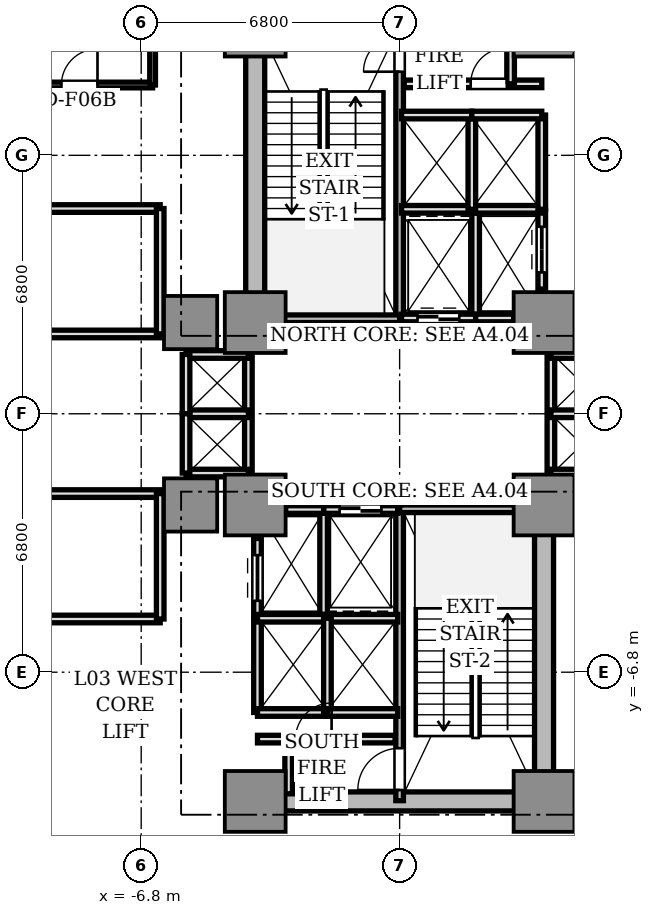
"""IFC4 building model, lengths in metres.
Left out: names, types, materials, properties, quantities, classifications, styles, units other than length and angle.
Written with IfcOpenShell. Run it as: python <this file> out.ifc"""

import sys

from ifc_helpers import new_model, si_unit, direction, frame, frame_2d, origin, origin_2d, place, context, subcontext, project, spatial, rectangle, extrude, source, transform, mapped, element, fill, save


model = new_model("IFC4")
c1 = context("Model", 3, precision=1e-05, world=origin(), true_north=direction((0.0, 1.0)))
c2 = subcontext(c1, "Body", "Model", "MODEL_VIEW")
j1 = project(units=[si_unit("LENGTHUNIT", "METRE"), si_unit("PLANEANGLEUNIT", "RADIAN")], contexts=[c1])
p1 = place(None, origin())
s1 = spatial("IfcSite", under=j1, at=p1, CompositionType="ELEMENT")
p2 = place(p1, origin())
s2 = spatial("IfcBuilding", under=s1, at=p2, CompositionType="ELEMENT")
p3 = place(p2, frame((0.0, 0.0, 14.1)))
s3 = spatial("IfcBuildingStorey", under=s2, at=p3, CompositionType="ELEMENT", Elevation=14.1)
p4 = place(p3, frame((-3.8, 2.85, 0.0), z_axis=(0.0, 0.0, 1.0), x_axis=(0.0, 1.0, 0.0)))
e1 = element("IfcWall", 1, at=p4, inside=s3, PredefinedType="SHEAR", context=c2, shape_type="SweptSolid", body=[
    extrude(rectangle(XDim=6.9, YDim=0.5, at=frame_2d((3.45, 0.0))), origin(), (0.0, 0.0, 1.0), 4.18),
])
p5 = place(p3, frame((-3.55, -10.2, 0.0), z_axis=(0.0, 0.0, 1.0), x_axis=(1.0, 0.0, 0.0)))
e2 = element("IfcWall", 2, at=p5, inside=s3, PredefinedType="SHEAR", context=c2, shape_type="SweptSolid", body=[
    extrude(rectangle(XDim=7.1, YDim=0.5, at=frame_2d((3.55, 0.0))), origin(), (0.0, 0.0, 1.0), 4.18),
])
p6 = place(p3, frame((3.8, -9.75, 0.0), z_axis=(0.0, 0.0, 1.0), x_axis=(0.0, 1.0, 0.0)))
e3 = element("IfcWall", 3, at=p6, inside=s3, PredefinedType="SHEAR", context=c2, shape_type="SweptSolid", body=[
    extrude(rectangle(XDim=6.9, YDim=0.5, at=frame_2d((3.45, 0.0))), origin(), (0.0, 0.0, 1.0), 4.18),
])
m1 = source(origin(), c2, "Body", "SweptSolid", [
    extrude(rectangle(XDim=1.6, YDim=1.6, at=origin_2d()), origin(), (0.0, 0.0, 1.0), 4.18),
])
for number, where, z_axis, x_axis in (
    (4, (-3.8, 2.4, 0.0), (0.0, 0.0, 1.0), (1.0, 0.0, 0.0)),
    (5, (3.8, 2.4, 0.0), (0.0, 0.0, 1.0), (1.0, 0.0, 0.0)),
    (6, (-3.8, 10.2, 0.0), (0.0, 0.0, 1.0), (1.0, 0.0, 0.0)),
    (7, (3.8, 10.2, 0.0), (0.0, 0.0, 1.0), (1.0, 0.0, 0.0)),
    (8, (-3.8, -2.4, 0.0), (0.0, 0.0, 1.0), (1.0, 0.0, 0.0)),
    (9, (3.8, -2.4, 0.0), (0.0, 0.0, 1.0), (1.0, 0.0, 0.0)),
    (10, (-3.8, -10.2, 0.0), (0.0, 0.0, 1.0), (1.0, 0.0, 0.0)),
    (11, (3.8, -10.2, 0.0), (0.0, 0.0, 1.0), (1.0, 0.0, 0.0)),
):
    element("IfcColumn", number, at=place(p3, frame(where, z_axis=z_axis, x_axis=x_axis)), inside=s3, PredefinedType="COLUMN", context=c2, shape_type="MappedRepresentation", body=[
        mapped(m1, transform((0.0, 0.0, 0.0), scale=1.0)),
    ])
m2 = source(origin(), c2, "Body", "SweptSolid", [
    extrude(rectangle(XDim=1.4, YDim=1.4, at=origin_2d()), origin(), (0.0, 0.0, 1.0), 4.18),
])
for number, where, z_axis, x_axis in (
    (12, (-5.5, 2.4, 0.0), (0.0, 0.0, 1.0), (1.0, 0.0, 0.0)),
    (13, (-5.5, -2.4, 0.0), (0.0, 0.0, 1.0), (1.0, 0.0, 0.0)),
):
    element("IfcColumn", number, at=place(p3, frame(where, z_axis=z_axis, x_axis=x_axis)), inside=s3, PredefinedType="COLUMN", context=c2, shape_type="MappedRepresentation", body=[
        mapped(m2, transform((0.0, 0.0, 0.0), scale=1.0)),
    ])
p7 = place(p3, frame((0.0, 2.5, 0.0), z_axis=(0.0, 0.0, 1.0), x_axis=(0.0, 1.0, 0.0)))
e14 = element("IfcWall", 14, at=p7, inside=s3, PredefinedType="SOLIDWALL", context=c2, shape_type="SweptSolid", body=[
    extrude(rectangle(XDim=7.68, YDim=0.2, at=frame_2d((3.84, 0.0))), origin(), (0.0, 0.0, 1.0), 4.18),
])
p8 = place(p7, frame((6.5, 0.0, 0.0)))
e15 = element("IfcOpeningElement", 15, at=p8, cuts=e14, PredefinedType="OPENING", context=c2, shape_type="SweptSolid", body=[
    extrude(rectangle(XDim=0.95, YDim=2.15, at=frame_2d((0.475, 1.075))), frame((0.0, 0.11, 0.0), z_axis=(0.0, -1.0, 0.0), x_axis=(1.0, 0.0, 0.0)), (0.0, 0.0, 1.0), 0.22),
])
p9 = place(p3, frame((-3.72, 2.5, 0.0), z_axis=(0.0, 0.0, 1.0), x_axis=(1.0, 0.0, 0.0)))
e16 = element("IfcWall", 16, at=p9, inside=s3, PredefinedType="SOLIDWALL", context=c2, shape_type="SweptSolid", body=[
    extrude(rectangle(XDim=3.72, YDim=0.2, at=frame_2d((1.86, 0.0))), origin(), (0.0, 0.0, 1.0), 4.18),
])
p10 = place(p3, frame((0.0, -10.18, 0.0), z_axis=(0.0, 0.0, 1.0), x_axis=(0.0, 1.0, 0.0)))
e17 = element("IfcWall", 17, at=p10, inside=s3, PredefinedType="SOLIDWALL", context=c2, shape_type="SweptSolid", body=[
    extrude(rectangle(XDim=7.68, YDim=0.2, at=frame_2d((3.84, 0.0))), origin(), (0.0, 0.0, 1.0), 4.18),
])
p11 = place(p10, frame((0.28, 0.0, 0.0)))
e18 = element("IfcOpeningElement", 18, at=p11, cuts=e17, PredefinedType="OPENING", context=c2, shape_type="SweptSolid", body=[
    extrude(rectangle(XDim=1.1, YDim=2.15, at=frame_2d((0.55, 1.075))), frame((0.0, 0.11, 0.0), z_axis=(0.0, -1.0, 0.0), x_axis=(1.0, 0.0, 0.0)), (0.0, 0.0, 1.0), 0.22),
])
p12 = place(p3, frame((0.0, -2.5, 0.0), z_axis=(0.0, 0.0, 1.0), x_axis=(1.0, 0.0, 0.0)))
e19 = element("IfcWall", 19, at=p12, inside=s3, PredefinedType="SOLIDWALL", context=c2, shape_type="SweptSolid", body=[
    extrude(rectangle(XDim=3.72, YDim=0.2, at=frame_2d((1.86, 0.0))), origin(), (0.0, 0.0, 1.0), 4.18),
])
p13 = place(p3, frame((2.0, 2.5, 0.0), z_axis=(0.0, 0.0, 1.0), x_axis=(0.0, 1.0, 0.0)))
e20 = element("IfcWall", 20, at=p13, inside=s3, PredefinedType="SOLIDWALL", context=c2, shape_type="SweptSolid", body=[
    extrude(rectangle(XDim=2.78, YDim=0.2, at=frame_2d((1.39, 0.0))), origin(), (0.0, 0.0, 1.0), 3.73),
])
p14 = place(p3, frame((0.05, 2.52, 0.0), z_axis=(0.0, 0.0, 1.0), x_axis=(1.0, 0.0, 0.0)))
e21 = element("IfcWall", 21, at=p14, inside=s3, PredefinedType="SOLIDWALL", context=c2, shape_type="SweptSolid", body=[
    extrude(rectangle(XDim=1.95, YDim=0.2, at=frame_2d((0.975, 0.0))), origin(), (0.0, 0.0, 1.0), 3.73),
])
p15 = place(p14, frame((0.42, 0.0, 0.0)))
e22 = element("IfcOpeningElement", 22, at=p15, cuts=e21, PredefinedType="OPENING", context=c2, shape_type="SweptSolid", body=[
    extrude(rectangle(XDim=1.1, YDim=2.2, at=frame_2d((0.55, 1.1))), frame((0.0, 0.11, 0.0), z_axis=(0.0, -1.0, 0.0), x_axis=(1.0, 0.0, 0.0)), (0.0, 0.0, 1.0), 0.22),
])
p16 = place(p3, frame((-2.0, -5.28, 0.0), z_axis=(0.0, 0.0, 1.0), x_axis=(0.0, 1.0, 0.0)))
e23 = element("IfcWall", 23, at=p16, inside=s3, PredefinedType="SOLIDWALL", context=c2, shape_type="SweptSolid", body=[
    extrude(rectangle(XDim=2.78, YDim=0.2, at=frame_2d((1.39, 0.0))), origin(), (0.0, 0.0, 1.0), 3.73),
])
p17 = place(p3, frame((-2.0, -2.52, 0.0), z_axis=(0.0, 0.0, 1.0), x_axis=(1.0, 0.0, 0.0)))
e24 = element("IfcWall", 24, at=p17, inside=s3, PredefinedType="SOLIDWALL", context=c2, shape_type="SweptSolid", body=[
    extrude(rectangle(XDim=1.95, YDim=0.2, at=frame_2d((0.975, 0.0))), origin(), (0.0, 0.0, 1.0), 3.73),
])
p18 = place(p17, frame((0.42, 0.0, 0.0)))
e25 = element("IfcOpeningElement", 25, at=p18, cuts=e24, PredefinedType="OPENING", context=c2, shape_type="SweptSolid", body=[
    extrude(rectangle(XDim=1.1, YDim=2.2, at=frame_2d((0.55, 1.1))), frame((0.0, 0.11, 0.0), z_axis=(0.0, -1.0, 0.0), x_axis=(1.0, 0.0, 0.0)), (0.0, 0.0, 1.0), 0.22),
])
p19 = place(p3, frame((2.0, 2.52, 0.0), z_axis=(0.0, 0.0, 1.0), x_axis=(1.0, 0.0, 0.0)))
e26 = element("IfcWall", 26, at=p19, inside=s3, PredefinedType="SOLIDWALL", context=c2, shape_type="SweptSolid", body=[
    extrude(rectangle(XDim=1.0, YDim=0.2, at=frame_2d((0.5, 0.0))), origin(), (0.0, 0.0, 1.0), 3.73),
])
p20 = place(p3, frame((3.74, 3.28, 0.0), z_axis=(0.0, 0.0, 1.0), x_axis=(0.0, 1.0, 0.0)))
e27 = element("IfcWall", 27, at=p20, inside=s3, PredefinedType="SOLIDWALL", context=c2, shape_type="SweptSolid", body=[
    extrude(rectangle(XDim=2.08, YDim=0.2, at=frame_2d((1.04, 0.0))), origin(), (0.0, 0.0, 1.0), 3.73),
])
p21 = place(p20, frame((0.44, 0.0, 0.0)))
e28 = element("IfcOpeningElement", 28, at=p21, cuts=e27, PredefinedType="OPENING", context=c2, shape_type="SweptSolid", body=[
    extrude(rectangle(XDim=1.2, YDim=2.2, at=frame_2d((0.6, 1.1))), frame((0.0, 0.11, 0.0), z_axis=(0.0, -1.0, 0.0), x_axis=(1.0, 0.0, 0.0)), (0.0, 0.0, 1.0), 0.22),
])
p22 = place(p3, frame((-3.0, -2.52, 0.0), z_axis=(0.0, 0.0, 1.0), x_axis=(1.0, 0.0, 0.0)))
e29 = element("IfcWall", 29, at=p22, inside=s3, PredefinedType="SOLIDWALL", context=c2, shape_type="SweptSolid", body=[
    extrude(rectangle(XDim=1.0, YDim=0.2, at=frame_2d((0.5, 0.0))), origin(), (0.0, 0.0, 1.0), 3.73),
])
p23 = place(p3, frame((-3.74, -5.36, 0.0), z_axis=(0.0, 0.0, 1.0), x_axis=(0.0, 1.0, 0.0)))
e30 = element("IfcWall", 30, at=p23, inside=s3, PredefinedType="SOLIDWALL", context=c2, shape_type="SweptSolid", body=[
    extrude(rectangle(XDim=2.08, YDim=0.2, at=frame_2d((1.04, 0.0))), origin(), (0.0, 0.0, 1.0), 3.73),
])
p24 = place(p23, frame((0.44, 0.0, 0.0)))
e31 = element("IfcOpeningElement", 31, at=p24, cuts=e30, PredefinedType="OPENING", context=c2, shape_type="SweptSolid", body=[
    extrude(rectangle(XDim=1.2, YDim=2.2, at=frame_2d((0.6, 1.1))), frame((0.0, 0.11, 0.0), z_axis=(0.0, -1.0, 0.0), x_axis=(1.0, 0.0, 0.0)), (0.0, 0.0, 1.0), 0.22),
])
p25 = place(p3, frame((0.05, 5.38, 0.0), z_axis=(0.0, 0.0, 1.0), x_axis=(1.0, 0.0, 0.0)))
e32 = element("IfcWall", 32, at=p25, inside=s3, PredefinedType="SOLIDWALL", context=c2, shape_type="SweptSolid", body=[
    extrude(rectangle(XDim=3.69, YDim=0.2, at=frame_2d((1.845, 0.0))), origin(), (0.0, 0.0, 1.0), 3.73),
])
p26 = place(p3, frame((1.9, 5.38, 0.0), z_axis=(0.0, 0.0, 1.0), x_axis=(0.0, 1.0, 0.0)))
e33 = element("IfcWall", 33, at=p26, inside=s3, PredefinedType="SOLIDWALL", context=c2, shape_type="SweptSolid", body=[
    extrude(rectangle(XDim=2.48, YDim=0.2, at=frame_2d((1.24, 0.0))), origin(), (0.0, 0.0, 1.0), 3.73),
])
p27 = place(p3, frame((0.05, 7.86, 0.0), z_axis=(0.0, 0.0, 1.0), x_axis=(1.0, 0.0, 0.0)))
e34 = element("IfcWall", 34, at=p27, inside=s3, PredefinedType="SOLIDWALL", context=c2, shape_type="SweptSolid", body=[
    extrude(rectangle(XDim=1.85, YDim=0.2, at=frame_2d((0.925, 0.0))), origin(), (0.0, 0.0, 1.0), 3.73),
])
p28 = place(p3, frame((3.74, 5.38, 0.0), z_axis=(0.0, 0.0, 1.0), x_axis=(0.0, 1.0, 0.0)))
e35 = element("IfcWall", 35, at=p28, inside=s3, PredefinedType="SOLIDWALL", context=c2, shape_type="SweptSolid", body=[
    extrude(rectangle(XDim=2.48, YDim=0.2, at=frame_2d((1.24, 0.0))), origin(), (0.0, 0.0, 1.0), 3.73),
])
p29 = place(p3, frame((1.9, 7.86, 0.0), z_axis=(0.0, 0.0, 1.0), x_axis=(1.0, 0.0, 0.0)))
e36 = element("IfcWall", 36, at=p29, inside=s3, PredefinedType="SOLIDWALL", context=c2, shape_type="SweptSolid", body=[
    extrude(rectangle(XDim=1.84, YDim=0.2, at=frame_2d((0.92, 0.0))), origin(), (0.0, 0.0, 1.0), 3.73),
])
p30 = place(p3, frame((-3.74, -7.86, 0.0), z_axis=(0.0, 0.0, 1.0), x_axis=(0.0, 1.0, 0.0)))
e37 = element("IfcWall", 37, at=p30, inside=s3, PredefinedType="SOLIDWALL", context=c2, shape_type="SweptSolid", body=[
    extrude(rectangle(XDim=2.48, YDim=0.2, at=frame_2d((1.24, 0.0))), origin(), (0.0, 0.0, 1.0), 3.73),
])
p31 = place(p3, frame((-3.74, -7.86, 0.0), z_axis=(0.0, 0.0, 1.0), x_axis=(1.0, 0.0, 0.0)))
e38 = element("IfcWall", 38, at=p31, inside=s3, PredefinedType="SOLIDWALL", context=c2, shape_type="SweptSolid", body=[
    extrude(rectangle(XDim=1.84, YDim=0.2, at=frame_2d((0.92, 0.0))), origin(), (0.0, 0.0, 1.0), 3.73),
])
p32 = place(p3, frame((-3.74, -5.38, 0.0), z_axis=(0.0, 0.0, 1.0), x_axis=(1.0, 0.0, 0.0)))
e39 = element("IfcWall", 39, at=p32, inside=s3, PredefinedType="SOLIDWALL", context=c2, shape_type="SweptSolid", body=[
    extrude(rectangle(XDim=3.69, YDim=0.2, at=frame_2d((1.845, 0.0))), origin(), (0.0, 0.0, 1.0), 3.73),
])
p33 = place(p3, frame((-1.9, -7.86, 0.0), z_axis=(0.0, 0.0, 1.0), x_axis=(0.0, 1.0, 0.0)))
e40 = element("IfcWall", 40, at=p33, inside=s3, PredefinedType="SOLIDWALL", context=c2, shape_type="SweptSolid", body=[
    extrude(rectangle(XDim=2.48, YDim=0.2, at=frame_2d((1.24, 0.0))), origin(), (0.0, 0.0, 1.0), 3.73),
])
p34 = place(p3, frame((-1.9, -7.86, 0.0), z_axis=(0.0, 0.0, 1.0), x_axis=(1.0, 0.0, 0.0)))
e41 = element("IfcWall", 41, at=p34, inside=s3, PredefinedType="SOLIDWALL", context=c2, shape_type="SweptSolid", body=[
    extrude(rectangle(XDim=1.85, YDim=0.2, at=frame_2d((0.925, 0.0))), origin(), (0.0, 0.0, 1.0), 3.73),
])
p35 = place(p3, frame((3.98, -1.56, 0.0), z_axis=(0.0, 0.0, 1.0), x_axis=(0.0, 1.0, 0.0)))
e42 = element("IfcWall", 42, at=p35, inside=s3, PredefinedType="SOLIDWALL", context=c2, shape_type="SweptSolid", body=[
    extrude(rectangle(XDim=3.12, YDim=0.2, at=frame_2d((1.56, 0.0))), origin(), (0.0, 0.0, 1.0), 3.25),
])
for number, where, z_axis, x_axis in (
    (43, (3.98, 1.56, 0.0), (0.0, 0.0, 1.0), (1.0, 0.0, 0.0)),
    (44, (3.98, -1.56, 0.0), (0.0, 0.0, 1.0), (1.0, 0.0, 0.0)),
    (45, (3.98, 0.0, 0.0), (0.0, 0.0, 1.0), (1.0, 0.0, 0.0)),
):
    element("IfcWall", number, at=place(p3, frame(where, z_axis=z_axis, x_axis=x_axis)), inside=s3, PredefinedType="SOLIDWALL", context=c2, shape_type="SweptSolid", body=[
        extrude(rectangle(XDim=1.64, YDim=0.2, at=frame_2d((0.82, 0.0))), origin(), (0.0, 0.0, 1.0), 3.73),
    ])
p36 = place(p3, frame((-3.98, -1.56, 0.0), z_axis=(0.0, 0.0, 1.0), x_axis=(0.0, 1.0, 0.0)))
e46 = element("IfcWall", 46, at=p36, inside=s3, PredefinedType="SOLIDWALL", context=c2, shape_type="SweptSolid", body=[
    extrude(rectangle(XDim=3.12, YDim=0.2, at=frame_2d((1.56, 0.0))), origin(), (0.0, 0.0, 1.0), 3.25),
])
for number, where, z_axis, x_axis in (
    (47, (-5.62, 1.56, 0.0), (0.0, 0.0, 1.0), (1.0, 0.0, 0.0)),
    (48, (-5.62, -1.56, 0.0), (0.0, 0.0, 1.0), (1.0, 0.0, 0.0)),
    (49, (-5.62, 0.0, 0.0), (0.0, 0.0, 1.0), (1.0, 0.0, 0.0)),
):
    element("IfcWall", number, at=place(p3, frame(where, z_axis=z_axis, x_axis=x_axis)), inside=s3, PredefinedType="SOLIDWALL", context=c2, shape_type="SweptSolid", body=[
        extrude(rectangle(XDim=1.64, YDim=0.2, at=frame_2d((0.82, 0.0))), origin(), (0.0, 0.0, 1.0), 3.73),
    ])
for number, where, z_axis, x_axis in (
    (50, (-5.62, 0.0, 0.0), (0.0, 0.0, 1.0), (0.0, 1.0, 0.0)),
    (51, (-5.62, -1.56, 0.0), (0.0, 0.0, 1.0), (0.0, 1.0, 0.0)),
):
    element("IfcWall", number, at=place(p3, frame(where, z_axis=z_axis, x_axis=x_axis)), inside=s3, PredefinedType="SOLIDWALL", context=c2, shape_type="SweptSolid", body=[
        extrude(rectangle(XDim=1.56, YDim=0.2, at=frame_2d((0.78, 0.0))), origin(), (0.0, 0.0, 1.0), 3.73),
    ])
p37 = place(p3, frame((0.12, 8.68, 0.0), z_axis=(0.0, 0.0, 1.0), x_axis=(1.0, 0.0, 0.0)))
e52 = element("IfcWall", 52, at=p37, inside=s3, PredefinedType="SOLIDWALL", context=c2, shape_type="SweptSolid", body=[
    extrude(rectangle(XDim=3.62, YDim=0.2, at=frame_2d((1.81, 0.0))), origin(), (0.0, 0.0, 1.0), 3.73),
])
p38 = place(p37, frame((1.75, 0.0, 0.0)))
e53 = element("IfcOpeningElement", 53, at=p38, cuts=e52, PredefinedType="OPENING", context=c2, shape_type="SweptSolid", body=[
    extrude(rectangle(XDim=0.95, YDim=2.15, at=frame_2d((0.475, 1.075))), frame((0.0, 0.11, 0.0), z_axis=(0.0, -1.0, 0.0), x_axis=(1.0, 0.0, 0.0)), (0.0, 0.0, 1.0), 0.22),
])
p39 = place(p3, frame((2.92, 8.68, 0.0), z_axis=(0.0, 0.0, 1.0), x_axis=(0.0, 1.0, 0.0)))
e54 = element("IfcWall", 54, at=p39, inside=s3, PredefinedType="SOLIDWALL", context=c2, shape_type="SweptSolid", body=[
    extrude(rectangle(XDim=1.32, YDim=0.2, at=frame_2d((0.66, 0.0))), origin(), (0.0, 0.0, 1.0), 3.73),
])
p40 = place(p3, frame((-3.74, -8.56, 0.0), z_axis=(0.0, 0.0, 1.0), x_axis=(1.0, 0.0, 0.0)))
e55 = element("IfcWall", 55, at=p40, inside=s3, PredefinedType="SOLIDWALL", context=c2, shape_type="SweptSolid", body=[
    extrude(rectangle(XDim=3.62, YDim=0.2, at=frame_2d((1.81, 0.0))), origin(), (0.0, 0.0, 1.0), 3.73),
])
p41 = place(p40, frame((1.0, 0.0, 0.0)))
e56 = element("IfcOpeningElement", 56, at=p41, cuts=e55, PredefinedType="OPENING", context=c2, shape_type="SweptSolid", body=[
    extrude(rectangle(XDim=0.95, YDim=2.15, at=frame_2d((0.475, 1.075))), frame((0.0, 0.11, 0.0), z_axis=(0.0, -1.0, 0.0), x_axis=(1.0, 0.0, 0.0)), (0.0, 0.0, 1.0), 0.22),
])
p42 = place(p3, frame((-2.92, -10.0, 0.0), z_axis=(0.0, 0.0, 1.0), x_axis=(0.0, 1.0, 0.0)))
e57 = element("IfcWall", 57, at=p42, inside=s3, PredefinedType="SOLIDWALL", context=c2, shape_type="SweptSolid", body=[
    extrude(rectangle(XDim=1.44, YDim=0.2, at=frame_2d((0.72, 0.0))), origin(), (0.0, 0.0, 1.0), 3.73),
])
for number, where, z_axis, x_axis in (
    (58, (-25.2, 5.4, 0.0), (0.0, 0.0, 1.0), (1.0, 0.0, 0.0)),
    (59, (-25.2, 2.1, 0.0), (0.0, 0.0, 1.0), (1.0, 0.0, 0.0)),
):
    element("IfcWall", number, at=place(p3, frame(where, z_axis=z_axis, x_axis=x_axis)), inside=s3, PredefinedType="SOLIDWALL", context=c2, shape_type="SweptSolid", body=[
        extrude(rectangle(XDim=18.9, YDim=0.2, at=frame_2d((9.45, 0.0))), origin(), (0.0, 0.0, 1.0), 3.25),
    ])
p43 = place(p3, frame((-6.3, 2.1, 0.0), z_axis=(0.0, 0.0, 1.0), x_axis=(0.0, 1.0, 0.0)))
e60 = element("IfcWall", 60, at=p43, inside=s3, PredefinedType="SOLIDWALL", context=c2, shape_type="SweptSolid", body=[
    extrude(rectangle(XDim=3.3, YDim=0.2, at=frame_2d((1.65, 0.0))), origin(), (0.0, 0.0, 1.0), 3.73),
])
for number, where, z_axis, x_axis in (
    (61, (-25.2, -2.1, 0.0), (0.0, 0.0, 1.0), (1.0, 0.0, 0.0)),
    (62, (-25.2, -5.4, 0.0), (0.0, 0.0, 1.0), (1.0, 0.0, 0.0)),
):
    element("IfcWall", number, at=place(p3, frame(where, z_axis=z_axis, x_axis=x_axis)), inside=s3, PredefinedType="SOLIDWALL", context=c2, shape_type="SweptSolid", body=[
        extrude(rectangle(XDim=18.9, YDim=0.2, at=frame_2d((9.45, 0.0))), origin(), (0.0, 0.0, 1.0), 3.25),
    ])
p44 = place(p3, frame((-6.3, -5.4, 0.0), z_axis=(0.0, 0.0, 1.0), x_axis=(0.0, 1.0, 0.0)))
e63 = element("IfcWall", 63, at=p44, inside=s3, PredefinedType="SOLIDWALL", context=c2, shape_type="SweptSolid", body=[
    extrude(rectangle(XDim=3.3, YDim=0.2, at=frame_2d((1.65, 0.0))), origin(), (0.0, 0.0, 1.0), 3.73),
])
p45 = place(p3, frame((-10.05, 8.65, 0.0), z_axis=(0.0, 0.0, 1.0), x_axis=(1.0, 0.0, 0.0)))
e64 = element("IfcWall", 64, at=p45, inside=s3, PredefinedType="PARTITIONING", context=c2, shape_type="SweptSolid", body=[
    extrude(rectangle(XDim=3.55, YDim=0.15, at=frame_2d((1.775, 0.0))), origin(), (0.0, 0.0, 1.0), 3.73),
])
p46 = place(p45, frame((1.15, 0.0, 0.0)))
e65 = element("IfcOpeningElement", 65, at=p46, cuts=e64, PredefinedType="OPENING", context=c2, shape_type="SweptSolid", body=[
    extrude(rectangle(XDim=0.95, YDim=2.15, at=frame_2d((0.475, 1.075))), frame((0.0, 0.085, 0.0), z_axis=(0.0, -1.0, 0.0), x_axis=(1.0, 0.0, 0.0)), (0.0, 0.0, 1.0), 0.17),
])
p47 = place(p3, frame((-6.5, 8.65, 0.0), z_axis=(0.0, 0.0, 1.0), x_axis=(0.0, 1.0, 0.0)))
e66 = element("IfcWall", 66, at=p47, inside=s3, PredefinedType="PARTITIONING", context=c2, shape_type="SweptSolid", body=[
    extrude(rectangle(XDim=5.05, YDim=0.15, at=frame_2d((2.525, 0.0))), origin(), (0.0, 0.0, 1.0), 3.73),
])
m3 = source(origin(), c2, "Body", "SweptSolid", [
    extrude(rectangle(XDim=1.1, YDim=0.05, at=origin_2d()), origin(), (0.0, 0.0, 1.0), 2.2),
])
p48 = place(p15, frame((0.55, 0.0, 0.0)))
e67 = element("IfcDoor", 67, at=p48, inside=s3, OperationType="DOUBLE_DOOR_SLIDING", PredefinedType="DOOR", context=c2, shape_type="MappedRepresentation", body=[
    mapped(m3, transform((0.0, 0.0, 0.0), scale=1.0)),
])
fill(e22, e67)
p49 = place(p18, frame((0.55, 0.0, 0.0)))
e68 = element("IfcDoor", 68, at=p49, inside=s3, OperationType="DOUBLE_DOOR_SLIDING", PredefinedType="DOOR", context=c2, shape_type="MappedRepresentation", body=[
    mapped(m3, transform((0.0, 0.0, 0.0), scale=1.0)),
])
fill(e25, e68)
m4 = source(origin(), c2, "Body", "SweptSolid", [
    extrude(rectangle(XDim=1.2, YDim=0.05, at=origin_2d()), origin(), (0.0, 0.0, 1.0), 2.2),
])
p50 = place(p21, frame((0.6, 0.0, 0.0)))
e69 = element("IfcDoor", 69, at=p50, inside=s3, OperationType="DOUBLE_DOOR_SLIDING", PredefinedType="DOOR", context=c2, shape_type="MappedRepresentation", body=[
    mapped(m4, transform((0.0, 0.0, 0.0), scale=1.0)),
])
fill(e28, e69)
p51 = place(p24, frame((0.6, 0.0, 0.0)))
e70 = element("IfcDoor", 70, at=p51, inside=s3, OperationType="DOUBLE_DOOR_SLIDING", PredefinedType="DOOR", context=c2, shape_type="MappedRepresentation", body=[
    mapped(m4, transform((0.0, 0.0, 0.0), scale=1.0)),
])
fill(e31, e70)
m5 = source(origin(), c2, "Body", "SweptSolid", [
    extrude(rectangle(XDim=0.95, YDim=0.05, at=origin_2d()), origin(), (0.0, 0.0, 1.0), 2.15),
])
p52 = place(p8, frame((0.475, 0.0, 0.0)))
e71 = element("IfcDoor", 71, at=p52, inside=s3, OperationType="SINGLE_SWING_LEFT", PredefinedType="DOOR", context=c2, shape_type="MappedRepresentation", body=[
    mapped(m5, transform((0.0, 0.0, 0.0), scale=1.0)),
])
fill(e15, e71)
p53 = place(p38, frame((0.475, 0.0, 0.0)))
e72 = element("IfcDoor", 72, at=p53, inside=s3, OperationType="SINGLE_SWING_RIGHT", PredefinedType="DOOR", context=c2, shape_type="MappedRepresentation", body=[
    mapped(m5, transform((0.0, 0.0, 0.0), scale=1.0)),
])
fill(e53, e72)
m6 = source(origin(), c2, "Body", "SweptSolid", [
    extrude(rectangle(XDim=1.1, YDim=0.05, at=origin_2d()), origin(), (0.0, 0.0, 1.0), 2.15),
])
p54 = place(p11, frame((0.55, 0.0, 0.0)))
e73 = element("IfcDoor", 73, at=p54, inside=s3, OperationType="SINGLE_SWING_LEFT", PredefinedType="DOOR", context=c2, shape_type="MappedRepresentation", body=[
    mapped(m6, transform((0.0, 0.0, 0.0), scale=1.0)),
])
fill(e18, e73)
p55 = place(p41, frame((0.475, 0.0, 0.0)))
e74 = element("IfcDoor", 74, at=p55, inside=s3, OperationType="SINGLE_SWING_RIGHT", PredefinedType="DOOR", context=c2, shape_type="MappedRepresentation", body=[
    mapped(m5, transform((0.0, 0.0, 0.0), scale=1.0)),
])
fill(e56, e74)
p56 = place(p46, frame((0.475, 0.0, 0.0)))
e75 = element("IfcDoor", 75, at=p56, inside=s3, OperationType="SINGLE_SWING_RIGHT", PredefinedType="DOOR", context=c2, shape_type="MappedRepresentation", body=[
    mapped(m5, transform((0.0, 0.0, 0.0), scale=1.0)),
])
fill(e65, e75)
save(model, sys.argv[1])
